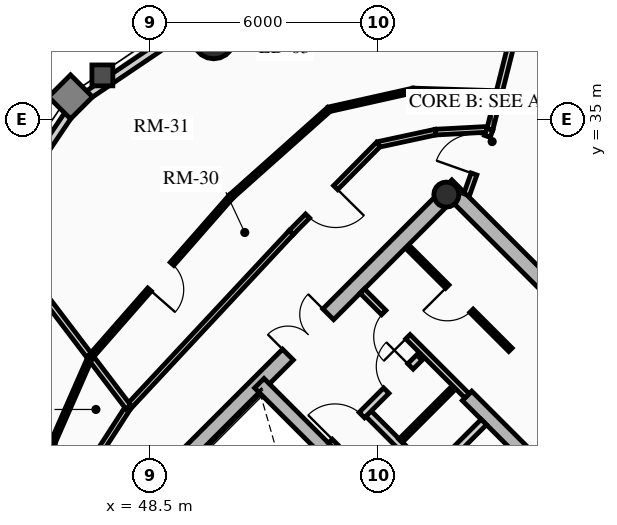
"""IFC4 building model, lengths in metres.
Left out: names, types, materials, properties, quantities, classifications, styles, units other than length and angle.
Written with IfcOpenShell. Run it as: python <this file> out.ifc"""

import sys

from ifc_helpers import new_model, si_unit, direction, frame, frame_2d, origin, origin_2d, place, context, subcontext, project, spatial, rectangle, circle, hollow_circle, extrude, source, transform, mapped, element, fill, save


model = new_model("IFC4")
c1 = context("Model", 3, precision=1e-05, world=origin(), true_north=direction((0.0, 1.0)))
c2 = subcontext(c1, "Body", "Model", "MODEL_VIEW")
j1 = project(units=[si_unit("LENGTHUNIT", "METRE"), si_unit("PLANEANGLEUNIT", "RADIAN")], contexts=[c1])
p1 = place(None, origin())
s1 = spatial("IfcSite", under=j1, at=p1, CompositionType="ELEMENT")
p2 = place(p1, origin())
s2 = spatial("IfcBuilding", under=s1, at=p2, CompositionType="ELEMENT")
p3 = place(p2, frame((0.0, 0.0, 226.05)))
s3 = spatial("IfcBuildingStorey", under=s2, at=p3, CompositionType="ELEMENT", Elevation=226.05)
p4 = place(p3, frame((66.268, 23.298, 0.0), z_axis=(0.0, 0.0, 1.0), x_axis=(-0.707106781187, 0.707106781187, 0.0)))
e1 = element("IfcWall", 1, at=p4, inside=s3, PredefinedType="SHEAR", context=c2, shape_type="SweptSolid", body=[
    extrude(rectangle(XDim=14.1, YDim=0.4, at=frame_2d((7.05, 0.0))), origin(), (0.0, 0.0, 1.0), 3.2),
])
p5 = place(p3, frame((48.873, 25.561, 0.0), z_axis=(0.0, 0.0, 1.0), x_axis=(0.707106781187, 0.707106781187, 0.0)))
e2 = element("IfcWall", 2, at=p5, inside=s3, PredefinedType="SHEAR", context=c2, shape_type="SweptSolid", body=[
    extrude(rectangle(XDim=10.7, YDim=0.4, at=frame_2d((5.35, 0.0))), origin(), (0.0, 0.0, 1.0), 3.2),
])
m1 = source(origin(), c2, "Body", "SweptSolid", [
    extrude(rectangle(XDim=1.5, YDim=2.02, at=frame_2d((0.75, 1.01))), frame((0.0, 0.21, 0.0), z_axis=(0.0, -1.0, 0.0), x_axis=(1.0, 0.0, 0.0)), (0.0, 0.0, 1.0), 0.42),
])
p6 = place(p5, frame((4.6, 0.0, 0.0)))
e3 = element("IfcOpeningElement", 3, at=p6, cuts=e2, PredefinedType="OPENING", context=c2, shape_type="MappedRepresentation", body=[
    mapped(m1, transform((0.0, 0.0, 0.0), x_axis=(1.0, 0.0, 0.0), y_axis=(0.0, 1.0, 0.0), z_axis=(0.0, 0.0, 1.0), scale=1.0)),
])
p7 = place(p3, frame((61.06, 18.373, 0.0), z_axis=(0.0, 0.0, 1.0), x_axis=(-0.707106781187, 0.707106781187, 0.0)))
e4 = element("IfcWall", 4, at=p7, inside=s3, PredefinedType="SHEAR", context=c2, shape_type="SweptSolid", body=[
    extrude(rectangle(XDim=13.7, YDim=0.35, at=frame_2d((6.85, 0.0))), origin(), (0.0, 0.0, 1.0), 3.2),
])
m2 = source(origin(), c2, "Body", "SweptSolid", [
    extrude(rectangle(XDim=1.1, YDim=2.015, at=frame_2d((0.55, 1.007))), frame((0.0, 0.185, 0.0), z_axis=(0.0, -1.0, 0.0), x_axis=(1.0, 0.0, 0.0)), (0.0, 0.0, 1.0), 0.37),
])
p8 = place(p7, frame((4.85, 0.0, 0.0)))
e5 = element("IfcOpeningElement", 5, at=p8, cuts=e4, PredefinedType="OPENING", context=c2, shape_type="MappedRepresentation", body=[
    mapped(m2, transform((0.0, 0.0, 0.0), x_axis=(1.0, 0.0, 0.0), y_axis=(0.0, 1.0, 0.0), z_axis=(0.0, 0.0, 1.0), scale=1.0)),
])
p9 = place(p7, frame((0.625, 0.0, 0.0)))
e6 = element("IfcOpeningElement", 6, at=p9, cuts=e4, PredefinedType="OPENING", context=c2, shape_type="MappedRepresentation", body=[
    mapped(m2, transform((0.0, 0.0, 0.0), x_axis=(1.0, 0.0, 0.0), y_axis=(0.0, 1.0, 0.0), z_axis=(0.0, 0.0, 1.0), scale=1.0)),
])
p10 = place(p7, frame((2.625, 0.0, 0.0)))
e7 = element("IfcOpeningElement", 7, at=p10, cuts=e4, PredefinedType="OPENING", context=c2, shape_type="MappedRepresentation", body=[
    mapped(m2, transform((0.0, 0.0, 0.0), x_axis=(1.0, 0.0, 0.0), y_axis=(0.0, 1.0, 0.0), z_axis=(0.0, 0.0, 1.0), scale=1.0)),
])
m3 = source(origin(), c2, "Body", "SweptSolid", [
    extrude(rectangle(XDim=1.15, YDim=2.02, at=frame_2d((0.575, 1.01))), frame((0.0, 0.185, 0.0), z_axis=(0.0, -1.0, 0.0), x_axis=(1.0, 0.0, 0.0)), (0.0, 0.0, 1.0), 0.37),
])
p11 = place(p7, frame((7.27, 0.0, 0.0)))
e8 = element("IfcOpeningElement", 8, at=p11, cuts=e4, PredefinedType="OPENING", context=c2, shape_type="MappedRepresentation", body=[
    mapped(m3, transform((0.0, 0.0, 0.0), x_axis=(1.0, 0.0, 0.0), y_axis=(0.0, 1.0, 0.0), z_axis=(0.0, 0.0, 1.0), scale=1.0)),
])
p12 = place(p3, frame((63.627, 20.94, 0.0), z_axis=(0.0, 0.0, 1.0), x_axis=(-0.707119496762, 0.707094065383, 0.0)))
e9 = element("IfcWall", 9, at=p12, inside=s3, PredefinedType="SHEAR", context=c2, shape_type="SweptSolid", body=[
    extrude(rectangle(XDim=9.6, YDim=0.35, at=frame_2d((4.8, 0.0))), origin(), (0.0, 0.0, 1.0), 3.2),
])
p13 = place(p12, frame((5.28, 0.0, 0.0)))
e10 = element("IfcOpeningElement", 10, at=p13, cuts=e9, PredefinedType="OPENING", context=c2, shape_type="MappedRepresentation", body=[
    mapped(m3, transform((0.0, 0.0, 0.0), x_axis=(1.0, 0.0, 0.0), y_axis=(0.0, 1.0, 0.0), z_axis=(0.0, 0.0, 1.0), scale=1.0)),
])
p14 = place(p3, frame((56.294, 33.024, 0.0), z_axis=(0.0, 0.0, 1.0), x_axis=(0.707106781187, 0.707106781187, 0.0)))
e11 = element("IfcColumn", 11, at=p14, inside=s3, PredefinedType="COLUMN", context=c2, shape_type="SweptSolid", body=[
    extrude(hollow_circle(Radius=0.33, WallThickness=0.025, at=origin_2d()), origin(), (0.0, 0.0, 1.0), 3.2),
])
p15 = place(p3, frame((50.173, 37.146, 0.0), z_axis=(0.0, 0.0, 1.0), x_axis=(1.0, 0.0, 0.0)))
e12 = element("IfcColumn", 12, at=p15, inside=s3, PredefinedType="USERDEFINED", context=c2, shape_type="SweptSolid", body=[
    extrude(circle(Radius=0.55, at=origin_2d()), origin(), (0.0, 0.0, 1.0), 3.2),
])
p16 = place(p3, frame((46.561, 35.439, 0.0), z_axis=(0.0, 0.0, 1.0), x_axis=(0.828833723692, 0.559495003079, 0.0)))
e13 = element("IfcWall", 13, at=p16, inside=s3, PredefinedType="SOLIDWALL", context=c2, shape_type="SweptSolid", body=[
    extrude(rectangle(XDim=3.976, YDim=0.22, at=frame_2d((1.988, 0.0))), origin(), (0.0, 0.0, 1.0), 2.612),
])
p17 = place(p3, frame((44.337, 32.144, 0.0), z_axis=(0.0, 0.0, 1.0), x_axis=(0.559495003079, 0.828833723692, 0.0)))
e14 = element("IfcWall", 14, at=p17, inside=s3, PredefinedType="SOLIDWALL", context=c2, shape_type="SweptSolid", body=[
    extrude(rectangle(XDim=3.976, YDim=0.22, at=frame_2d((1.988, 0.0))), origin(), (0.0, 0.0, 1.0), 2.612),
])
m4 = source(origin(), c2, "Body", "SweptSolid", [
    extrude(rectangle(XDim=1.05, YDim=1.3, at=frame_2d((0.525, 0.65))), frame((0.0, 0.12, 0.0), z_axis=(0.0, -1.0, 0.0), x_axis=(1.0, 0.0, 0.0)), (0.0, 0.0, 1.0), 0.24),
])
p18 = place(p17, frame((1.463, 0.0, 0.65)))
e15 = element("IfcOpeningElement", 15, at=p18, cuts=e14, PredefinedType="OPENING", context=c2, shape_type="MappedRepresentation", body=[
    mapped(m4, transform((0.0, 0.0, 0.0), x_axis=(1.0, 0.0, 0.0), y_axis=(0.0, 1.0, 0.0), z_axis=(0.0, 0.0, 1.0), scale=1.0)),
])
p19 = place(p3, frame((54.961, 24.719, 0.0), z_axis=(0.0, 0.0, 1.0), x_axis=(0.707106781187, 0.707106781187, 0.0)))
e16 = element("IfcWall", 16, at=p19, inside=s3, PredefinedType="PARTITIONING", context=c2, shape_type="SweptSolid", body=[
    extrude(rectangle(XDim=3.28, YDim=0.2, at=frame_2d((1.64, 0.0))), origin(), (0.0, 0.0, 1.0), 2.975),
])
m5 = source(origin(), c2, "Body", "SweptSolid", [
    extrude(rectangle(XDim=0.9, YDim=2.005, at=frame_2d((0.45, 1.002))), frame((0.0, 0.11, 0.0), z_axis=(0.0, -1.0, 0.0), x_axis=(1.0, 0.0, 0.0)), (0.0, 0.0, 1.0), 0.22),
])
p20 = place(p19, frame((0.16, 0.0, 0.0)))
e17 = element("IfcOpeningElement", 17, at=p20, cuts=e16, PredefinedType="OPENING", context=c2, shape_type="MappedRepresentation", body=[
    mapped(m5, transform((0.0, 0.0, 0.0), x_axis=(1.0, 0.0, 0.0), y_axis=(0.0, 1.0, 0.0), z_axis=(0.0, 0.0, 1.0), scale=1.0)),
])
p21 = place(p3, frame((55.874, 25.631, 0.0), z_axis=(0.0, 0.0, 1.0), x_axis=(-0.707157639372, 0.707055919343, 0.0)))
e18 = element("IfcWall", 18, at=p21, inside=s3, PredefinedType="PARTITIONING", context=c2, shape_type="SweptSolid", body=[
    extrude(rectangle(XDim=2.4, YDim=0.2, at=frame_2d((1.2, 0.0))), origin(), (0.0, 0.0, 1.0), 2.975),
])
p22 = place(p21, frame((0.14, 0.0, 0.0)))
e19 = element("IfcOpeningElement", 19, at=p22, cuts=e18, PredefinedType="OPENING", context=c2, shape_type="MappedRepresentation", body=[
    mapped(m5, transform((0.0, 0.0, 0.0), x_axis=(1.0, 0.0, 0.0), y_axis=(0.0, 1.0, 0.0), z_axis=(0.0, 0.0, 1.0), scale=1.0)),
])
p23 = place(p3, frame((53.264, 26.416, 0.0), z_axis=(0.0, 0.0, 1.0), x_axis=(0.707106781187, 0.707106781187, 0.0)))
e20 = element("IfcWall", 20, at=p23, inside=s3, PredefinedType="PARTITIONING", context=c2, shape_type="SweptSolid", body=[
    extrude(rectangle(XDim=3.28, YDim=0.2, at=frame_2d((1.64, 0.0))), origin(), (0.0, 0.0, 1.0), 2.975),
])
m6 = source(origin(), c2, "Body", "SweptSolid", [
    extrude(rectangle(XDim=1.0, YDim=2.015, at=frame_2d((0.5, 1.007))), frame((0.0, 0.11, 0.0), z_axis=(0.0, -1.0, 0.0), x_axis=(1.0, 0.0, 0.0)), (0.0, 0.0, 1.0), 0.22),
])
p24 = place(p23, frame((0.14, 0.0, 0.0)))
e21 = element("IfcOpeningElement", 21, at=p24, cuts=e20, PredefinedType="OPENING", context=c2, shape_type="MappedRepresentation", body=[
    mapped(m6, transform((0.0, 0.0, 0.0), x_axis=(1.0, 0.0, 0.0), y_axis=(0.0, 1.0, 0.0), z_axis=(0.0, 0.0, 1.0), scale=1.0)),
])
p25 = place(p23, frame((2.05, 0.0, 0.0)))
e22 = element("IfcOpeningElement", 22, at=p25, cuts=e20, PredefinedType="OPENING", context=c2, shape_type="MappedRepresentation", body=[
    mapped(m5, transform((0.0, 0.0, 0.0), x_axis=(1.0, 0.0, 0.0), y_axis=(0.0, 1.0, 0.0), z_axis=(0.0, 0.0, 1.0), scale=1.0)),
])
p26 = place(p3, frame((55.089, 26.543, 0.0), z_axis=(0.0, 0.0, 1.0), x_axis=(0.707106781187, 0.707106781187, 0.0)))
e23 = element("IfcWall", 23, at=p26, inside=s3, PredefinedType="PARTITIONING", context=c2, shape_type="SweptSolid", body=[
    extrude(rectangle(XDim=1.88, YDim=0.125, at=frame_2d((0.94, 0.0))), origin(), (0.0, 0.0, 1.0), 2.975),
])
p27 = place(p3, frame((56.839, 27.728, 0.0), z_axis=(0.0, 0.0, 1.0), x_axis=(-0.707106781187, 0.707106781187, 0.0)))
e24 = element("IfcWall", 24, at=p27, inside=s3, PredefinedType="PARTITIONING", context=c2, shape_type="SweptSolid", body=[
    extrude(rectangle(XDim=3.9, YDim=0.16, at=frame_2d((1.95, 0.0))), origin(), (0.0, 0.0, 1.0), 2.975),
])
m7 = source(origin(), c2, "Body", "SweptSolid", [
    extrude(rectangle(XDim=0.9, YDim=2.005, at=frame_2d((0.45, 1.002))), frame((0.0, 0.09, 0.0), z_axis=(0.0, -1.0, 0.0), x_axis=(1.0, 0.0, 0.0)), (0.0, 0.0, 1.0), 0.18),
])
p28 = place(p27, frame((2.2, 0.0, 0.0)))
e25 = element("IfcOpeningElement", 25, at=p28, cuts=e24, PredefinedType="OPENING", context=c2, shape_type="MappedRepresentation", body=[
    mapped(m7, transform((0.0, 0.0, 0.0), x_axis=(1.0, 0.0, 0.0), y_axis=(0.0, 1.0, 0.0), z_axis=(0.0, 0.0, 1.0), scale=1.0)),
])
p29 = place(p3, frame((57.981, 28.941, 0.0), z_axis=(0.0, 0.0, 1.0), x_axis=(-0.707074823725, 0.707138737204, 0.0)))
e26 = element("IfcWall", 26, at=p29, inside=s3, PredefinedType="PARTITIONING", context=c2, shape_type="SweptSolid", body=[
    extrude(rectangle(XDim=3.82, YDim=0.125, at=frame_2d((1.91, 0.0))), origin(), (0.0, 0.0, 1.0), 2.975),
])
m8 = source(origin(), c2, "Body", "SweptSolid", [
    extrude(rectangle(XDim=0.9, YDim=2.005, at=frame_2d((0.45, 1.002))), frame((0.0, 0.073, 0.0), z_axis=(0.0, -1.0, 0.0), x_axis=(1.0, 0.0, 0.0)), (0.0, 0.0, 1.0), 0.145),
])
p30 = place(p29, frame((1.45, 0.0, 0.0)))
e27 = element("IfcOpeningElement", 27, at=p30, cuts=e26, PredefinedType="OPENING", context=c2, shape_type="MappedRepresentation", body=[
    mapped(m8, transform((0.0, 0.0, 0.0), x_axis=(1.0, 0.0, 0.0), y_axis=(0.0, 1.0, 0.0), z_axis=(0.0, 0.0, 1.0), scale=1.0)),
])
p31 = place(p3, frame((57.44, 34.744, 0.0), z_axis=(0.0, 0.0, 1.0), x_axis=(-0.998578025565, -0.053309725738, 0.0)))
e28 = element("IfcWall", 28, at=p31, inside=s3, PredefinedType="PARTITIONING", context=c2, shape_type="SweptSolid", body=[
    extrude(rectangle(XDim=1.433, YDim=0.15, at=frame_2d((0.717, 0.0))), origin(), (0.0, 0.0, 1.0), 2.612),
])
p32 = place(p3, frame((56.009, 34.667, 0.0), z_axis=(0.0, 0.0, 1.0), x_axis=(-0.977625498152, -0.210353001795, 0.0)))
e29 = element("IfcWall", 29, at=p32, inside=s3, PredefinedType="PARTITIONING", context=c2, shape_type="SweptSolid", body=[
    extrude(rectangle(XDim=1.538, YDim=0.15, at=frame_2d((0.769, 0.0))), origin(), (0.0, 0.0, 1.0), 2.545),
])
p33 = place(p3, frame((54.506, 34.344, 0.0), z_axis=(0.0, 0.0, 1.0), x_axis=(-0.703053402247, -0.711137056824, 0.0)))
e30 = element("IfcWall", 30, at=p33, inside=s3, PredefinedType="PARTITIONING", context=c2, shape_type="SweptSolid", body=[
    extrude(rectangle(XDim=3.262, YDim=0.15, at=frame_2d((1.631, 0.0))), origin(), (0.0, 0.0, 1.0), 2.612),
])
m9 = source(origin(), c2, "Body", "SweptSolid", [
    extrude(rectangle(XDim=1.05, YDim=2.015, at=frame_2d((0.525, 1.007))), frame((0.0, 0.085, 0.0), z_axis=(0.0, -1.0, 0.0), x_axis=(1.0, 0.0, 0.0)), (0.0, 0.0, 1.0), 0.17),
])
p34 = place(p33, frame((1.599, 0.0, 0.0)))
e31 = element("IfcOpeningElement", 31, at=p34, cuts=e30, PredefinedType="OPENING", context=c2, shape_type="MappedRepresentation", body=[
    mapped(m9, transform((0.0, 0.0, 0.0), x_axis=(1.0, 0.0, 0.0), y_axis=(0.0, 1.0, 0.0), z_axis=(0.0, 0.0, 1.0), scale=1.0)),
])
p35 = place(p3, frame((52.212, 32.024, 0.0), z_axis=(0.0, 0.0, 1.0), x_axis=(-0.682158998173, -0.731203871169, 0.0)))
e32 = element("IfcWall", 32, at=p35, inside=s3, PredefinedType="PARTITIONING", context=c2, shape_type="SweptSolid", body=[
    extrude(rectangle(XDim=6.282, YDim=0.15, at=frame_2d((3.141, 0.0))), origin(), (0.0, 0.0, 1.0), 2.545),
])
p36 = place(p3, frame((47.927, 27.431, 0.0), z_axis=(0.0, 0.0, 1.0), x_axis=(-0.543126643356, -0.839650790077, 0.0)))
e33 = element("IfcWall", 33, at=p36, inside=s3, PredefinedType="PARTITIONING", context=c2, shape_type="SweptSolid", body=[
    extrude(rectangle(XDim=1.868, YDim=0.15, at=frame_2d((0.934, 0.0))), origin(), (0.0, 0.0, 1.0), 2.545),
])
p37 = place(p3, frame((57.44, 34.744, 0.0), z_axis=(0.0, 0.0, 1.0), x_axis=(0.243619816457, 0.969870808422, 0.0)))
e34 = element("IfcWall", 34, at=p37, inside=s3, PredefinedType="PARTITIONING", context=c2, shape_type="SweptSolid", body=[
    extrude(rectangle(XDim=3.496, YDim=0.16, at=frame_2d((1.748, 0.0))), origin(), (0.0, 0.0, 1.0), 2.612),
])
p38 = place(p3, frame((47.927, 27.431, 0.0), z_axis=(0.0, 0.0, 1.0), x_axis=(-0.604823333103, 0.796359677366, 0.0)))
e35 = element("IfcWall", 35, at=p38, inside=s3, PredefinedType="PARTITIONING", context=c2, shape_type="SweptSolid", body=[
    extrude(rectangle(XDim=5.907, YDim=0.16, at=frame_2d((2.953, 0.0))), origin(), (0.0, 0.0, 1.0), 2.612),
])
p39 = place(p3, frame((56.828, 33.021, 0.0), z_axis=(0.0, 0.0, 1.0), x_axis=(0.334788446034, 0.942293317605, 0.0)))
e36 = element("IfcWall", 36, at=p39, inside=s3, PredefinedType="PARTITIONING", context=c2, shape_type="SweptSolid", body=[
    extrude(rectangle(XDim=1.829, YDim=0.16, at=frame_2d((0.915, 0.0))), origin(), (0.0, 0.0, 1.0), 2.545),
])
m10 = source(origin(), c2, "Body", "SweptSolid", [
    extrude(rectangle(XDim=1.05, YDim=2.015, at=frame_2d((0.525, 1.007))), frame((0.0, 0.09, 0.0), z_axis=(0.0, -1.0, 0.0), x_axis=(1.0, 0.0, 0.0)), (0.0, 0.0, 1.0), 0.18),
])
p40 = place(p39, frame((0.579, 0.0, 0.0)))
e37 = element("IfcOpeningElement", 37, at=p40, cuts=e36, PredefinedType="OPENING", context=c2, shape_type="MappedRepresentation", body=[
    mapped(m10, transform((0.0, 0.0, 0.0), x_axis=(1.0, 0.0, 0.0), y_axis=(0.0, 1.0, 0.0), z_axis=(0.0, 0.0, 1.0), scale=1.0)),
])
p41 = place(p3, frame((57.679, 35.693, 0.0), z_axis=(0.0, 0.0, 1.0), x_axis=(-0.999526298938, 0.030776252722, 0.0)))
e38 = element("IfcWall", 38, at=p41, inside=s3, PredefinedType="PARTITIONING", context=c2, shape_type="SweptSolid", body=[
    extrude(rectangle(XDim=2.261, YDim=0.125, at=frame_2d((1.13, 0.0))), origin(), (0.0, 0.0, 1.0), 2.612),
])
p42 = place(p3, frame((55.419, 35.763, 0.0), z_axis=(0.0, 0.0, 1.0), x_axis=(-0.975917771425, -0.218138725166, 0.0)))
e39 = element("IfcWall", 39, at=p42, inside=s3, PredefinedType="PARTITIONING", context=c2, shape_type="SweptSolid", body=[
    extrude(rectangle(XDim=2.268, YDim=0.125, at=frame_2d((1.134, 0.0))), origin(), (0.0, 0.0, 1.0), 2.545),
])
p43 = place(p3, frame((53.206, 35.268, 0.0), z_axis=(0.0, 0.0, 1.0), x_axis=(-0.746677760999, -0.665185929819, 0.0)))
e40 = element("IfcWall", 40, at=p43, inside=s3, PredefinedType="PARTITIONING", context=c2, shape_type="SweptSolid", body=[
    extrude(rectangle(XDim=3.445, YDim=0.125, at=frame_2d((1.723, 0.0))), origin(), (0.0, 0.0, 1.0), 2.612),
])
p44 = place(p3, frame((50.634, 32.977, 0.0), z_axis=(0.0, 0.0, 1.0), x_axis=(-0.659241945747, -0.751930885765, 0.0)))
e41 = element("IfcWall", 41, at=p44, inside=s3, PredefinedType="PARTITIONING", context=c2, shape_type="SweptSolid", body=[
    extrude(rectangle(XDim=5.624, YDim=0.125, at=frame_2d((2.812, 0.0))), origin(), (0.0, 0.0, 1.0), 2.545),
])
p45 = place(p44, frame((2.362, 0.0, 0.0)))
e42 = element("IfcOpeningElement", 42, at=p45, cuts=e41, PredefinedType="OPENING", context=c2, shape_type="MappedRepresentation", body=[
    mapped(m8, transform((0.0, 0.0, 0.0), x_axis=(1.0, 0.0, 0.0), y_axis=(0.0, 1.0, 0.0), z_axis=(0.0, 0.0, 1.0), scale=1.0)),
])
p46 = place(p3, frame((46.927, 28.748, 0.0), z_axis=(0.0, 0.0, 1.0), x_axis=(-0.401820136661, -0.91571861277, 0.0)))
e43 = element("IfcWall", 43, at=p46, inside=s3, PredefinedType="PARTITIONING", context=c2, shape_type="SweptSolid", body=[
    extrude(rectangle(XDim=2.468, YDim=0.125, at=frame_2d((1.234, 0.0))), origin(), (0.0, 0.0, 1.0), 2.545),
])
p47 = place(p3, frame((45.935, 26.488, 0.0), z_axis=(0.0, 0.0, 1.0), x_axis=(0.138347758345, -0.990383712387, 0.0)))
e44 = element("IfcWall", 44, at=p47, inside=s3, PredefinedType="PARTITIONING", context=c2, shape_type="SweptSolid", body=[
    extrude(rectangle(XDim=2.202, YDim=0.125, at=frame_2d((1.101, 0.0))), origin(), (0.0, 0.0, 1.0), 2.612),
])
m11 = source(origin(), c2, "Body", "SweptSolid", [
    extrude(rectangle(XDim=1.5, YDim=2.02, at=frame_2d((0.75, 1.01))), frame((0.0, 0.025, 0.0), z_axis=(0.0, -1.0, 0.0), x_axis=(1.0, 0.0, 0.0)), (0.0, 0.0, 1.0), 0.05),
])
p48 = place(p6, origin())
e45 = element("IfcDoor", 45, at=p48, inside=s3, OperationType="DOUBLE_DOOR_SINGLE_SWING", PredefinedType="DOOR", context=c2, shape_type="MappedRepresentation", body=[
    mapped(m11, transform((0.0, 0.0, 0.0), x_axis=(1.0, 0.0, 0.0), y_axis=(0.0, 1.0, 0.0), z_axis=(0.0, 0.0, 1.0), scale=1.0)),
])
fill(e3, e45)
m12 = source(origin(), c2, "Body", "SweptSolid", [
    extrude(rectangle(XDim=1.0, YDim=2.015, at=frame_2d((0.5, 1.007))), frame((0.0, 0.025, 0.0), z_axis=(0.0, -1.0, 0.0), x_axis=(1.0, 0.0, 0.0)), (0.0, 0.0, 1.0), 0.05),
])
p49 = place(p24, origin())
e46 = element("IfcDoor", 46, at=p49, inside=s3, OperationType="SINGLE_SWING_LEFT", PredefinedType="DOOR", context=c2, shape_type="MappedRepresentation", body=[
    mapped(m12, transform((0.0, 0.0, 0.0), x_axis=(1.0, 0.0, 0.0), y_axis=(0.0, 1.0, 0.0), z_axis=(0.0, 0.0, 1.0), scale=1.0)),
])
fill(e21, e46)
m13 = source(origin(), c2, "Body", "SweptSolid", [
    extrude(rectangle(XDim=0.9, YDim=2.005, at=frame_2d((0.45, 1.002))), frame((0.0, 0.025, 0.0), z_axis=(0.0, -1.0, 0.0), x_axis=(1.0, 0.0, 0.0)), (0.0, 0.0, 1.0), 0.05),
])
p50 = place(p25, origin())
e47 = element("IfcDoor", 47, at=p50, inside=s3, OperationType="SINGLE_SWING_RIGHT", PredefinedType="DOOR", context=c2, shape_type="MappedRepresentation", body=[
    mapped(m13, transform((0.0, 0.0, 0.0), x_axis=(1.0, 0.0, 0.0), y_axis=(0.0, 1.0, 0.0), z_axis=(0.0, 0.0, 1.0), scale=1.0)),
])
fill(e22, e47)
p51 = place(p28, origin())
e48 = element("IfcDoor", 48, at=p51, inside=s3, OperationType="SINGLE_SWING_LEFT", PredefinedType="DOOR", context=c2, shape_type="MappedRepresentation", body=[
    mapped(m13, transform((0.0, 0.0, 0.0), x_axis=(1.0, 0.0, 0.0), y_axis=(0.0, 1.0, 0.0), z_axis=(0.0, 0.0, 1.0), scale=1.0)),
])
fill(e25, e48)
p52 = place(p30, origin())
e49 = element("IfcDoor", 49, at=p52, inside=s3, OperationType="SINGLE_SWING_RIGHT", PredefinedType="DOOR", context=c2, shape_type="MappedRepresentation", body=[
    mapped(m13, transform((0.0, 0.0, 0.0), x_axis=(1.0, 0.0, 0.0), y_axis=(0.0, 1.0, 0.0), z_axis=(0.0, 0.0, 1.0), scale=1.0)),
])
fill(e27, e49)
m14 = source(origin(), c2, "Body", "SweptSolid", [
    extrude(rectangle(XDim=1.05, YDim=2.015, at=frame_2d((0.525, 1.007))), frame((0.0, 0.025, 0.0), z_axis=(0.0, -1.0, 0.0), x_axis=(1.0, 0.0, 0.0)), (0.0, 0.0, 1.0), 0.05),
])
p53 = place(p40, origin())
e50 = element("IfcDoor", 50, at=p53, inside=s3, OperationType="SINGLE_SWING_LEFT", PredefinedType="DOOR", context=c2, shape_type="MappedRepresentation", body=[
    mapped(m14, transform((0.0, 0.0, 0.0), x_axis=(1.0, 0.0, 0.0), y_axis=(0.0, 1.0, 0.0), z_axis=(0.0, 0.0, 1.0), scale=1.0)),
])
fill(e37, e50)
p54 = place(p34, origin())
e51 = element("IfcDoor", 51, at=p54, inside=s3, OperationType="SINGLE_SWING_LEFT", PredefinedType="DOOR", context=c2, shape_type="MappedRepresentation", body=[
    mapped(m14, transform((0.0, 0.0, 0.0), x_axis=(1.0, 0.0, 0.0), y_axis=(0.0, 1.0, 0.0), z_axis=(0.0, 0.0, 1.0), scale=1.0)),
])
fill(e31, e51)
p55 = place(p45, origin())
e52 = element("IfcDoor", 52, at=p55, inside=s3, OperationType="SINGLE_SWING_RIGHT", PredefinedType="DOOR", context=c2, shape_type="MappedRepresentation", body=[
    mapped(m13, transform((0.0, 0.0, 0.0), x_axis=(1.0, 0.0, 0.0), y_axis=(0.0, 1.0, 0.0), z_axis=(0.0, 0.0, 1.0), scale=1.0)),
])
fill(e42, e52)
save(model, sys.argv[1])
